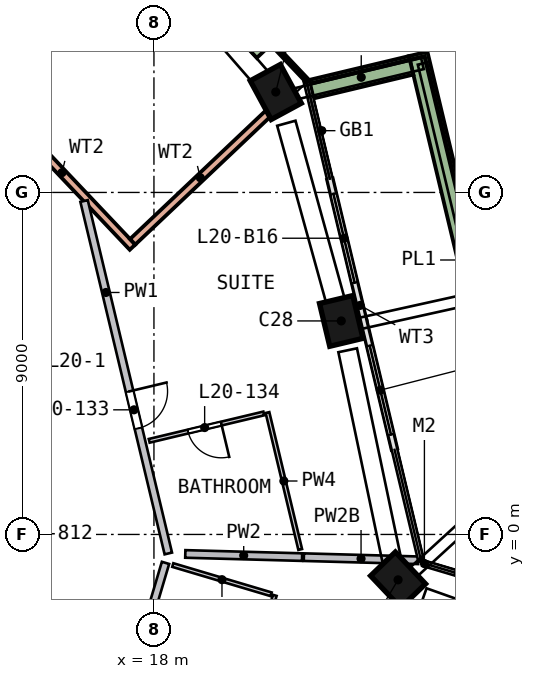
"""IFC4 building model, lengths in metres.
Left out: names, types, materials, properties, quantities, classifications, styles, units other than length and angle.
Written with IfcOpenShell. Run it as: python <this file> out.ifc"""

import sys

from ifc_helpers import new_model, si_unit, direction, frame, frame_2d, origin, origin_2d, place, context, subcontext, project, spatial, rectangle, extrude, element, fill, save


model = new_model("IFC4")
c1 = context("Model", 3, precision=1e-05, world=origin(), true_north=direction((0.0, 1.0)))
c2 = subcontext(c1, "Body", "Model", "MODEL_VIEW")
j1 = project(units=[si_unit("LENGTHUNIT", "METRE"), si_unit("PLANEANGLEUNIT", "RADIAN")], contexts=[c1])
p1 = place(None, origin())
s1 = spatial("IfcSite", under=j1, at=p1, CompositionType="ELEMENT")
p2 = place(p1, origin())
s2 = spatial("IfcBuilding", under=s1, at=p2, CompositionType="ELEMENT")
p3 = place(p2, frame((0.0, 0.0, 89.5)))
s3 = spatial("IfcBuildingStorey", under=s2, at=p3, CompositionType="ELEMENT", Elevation=89.5)
p4 = place(p3, frame((24.417, -1.335, 0.0), z_axis=(0.005397091, 0.116151488, 0.993216846), x_axis=(0.690131688, -0.719208539, 0.080357516)))
e1 = element("IfcColumn", 1, at=p4, inside=s3, PredefinedType="COLUMN", context=c2, shape_type="SweptSolid", body=[
    extrude(rectangle(XDim=1.15, YDim=0.9, at=origin_2d()), origin(), (0.0, 0.0, 1.0), 3.212),
])
p5 = place(p3, frame((22.962, 5.487, 0.0), z_axis=(-0.027073959, 0.108980291, 0.993675147), x_axis=(-0.231384883, 0.9663603, -0.112288943)))
e2 = element("IfcColumn", 2, at=p5, inside=s3, PredefinedType="COLUMN", context=c2, shape_type="SweptSolid", body=[
    extrude(rectangle(XDim=1.15, YDim=0.9, at=origin_2d()), origin(), (0.0, 0.0, 1.0), 3.21),
])
p6 = place(p3, frame((21.273, 11.521, 0.0), z_axis=(-0.05557524, 0.100734874, 0.993359893), x_axis=(0.472451123, -0.873816203, 0.115044255)))
e3 = element("IfcColumn", 3, at=p6, inside=s3, PredefinedType="COLUMN", context=c2, shape_type="SweptSolid", body=[
    extrude(rectangle(XDim=1.15, YDim=0.9, at=origin_2d()), origin(), (0.0, 0.0, 1.0), 3.211),
])
p7 = place(p3, frame((24.329, 2.241, 0.0), z_axis=(0.0, 0.0, 1.0), x_axis=(-0.232405626, 0.972618952, 0.0)))
e4 = element("IfcWall", 4, at=p7, inside=s3, PredefinedType="SOLIDWALL", context=c2, shape_type="SweptSolid", body=[
    extrude(rectangle(XDim=3.475, YDim=0.15, at=frame_2d((1.738, 0.0))), origin(), (0.0, 0.0, 1.0), 2.425),
])
p8 = place(p7, frame((0.4, 0.0, 0.0)))
e5 = element("IfcOpeningElement", 5, at=p8, cuts=e4, PredefinedType="OPENING", context=c2, shape_type="SweptSolid", body=[
    extrude(rectangle(XDim=2.4, YDim=2.4, at=frame_2d((1.2, 1.2))), frame((0.0, 0.085, 0.0), z_axis=(0.0, -1.0, 0.0), x_axis=(1.0, 0.0, 0.0)), (0.0, 0.0, 1.0), 0.17),
])
p9 = place(p3, frame((23.521, 5.621, 0.0), z_axis=(0.0, 0.0, 1.0), x_axis=(-0.232397815, 0.972620818, 0.0)))
e6 = element("IfcWall", 6, at=p9, inside=s3, PredefinedType="SOLIDWALL", context=c2, shape_type="SweptSolid", body=[
    extrude(rectangle(XDim=3.835, YDim=0.15, at=frame_2d((1.918, 0.0))), origin(), (0.0, 0.0, 1.0), 2.425),
])
p10 = place(p9, frame((1.035, 0.0, 0.0)))
e7 = element("IfcOpeningElement", 7, at=p10, cuts=e6, PredefinedType="OPENING", context=c2, shape_type="SweptSolid", body=[
    extrude(rectangle(XDim=2.4, YDim=2.4, at=frame_2d((1.2, 1.2))), frame((0.0, 0.085, 0.0), z_axis=(0.0, -1.0, 0.0), x_axis=(1.0, 0.0, 0.0)), (0.0, 0.0, 1.0), 0.17),
])
p11 = place(p3, frame((27.545, 1.799, 0.0), z_axis=(0.0, 0.0, 1.0), x_axis=(-0.232437266, 0.972611391, 0.0)))
e8 = element("IfcWall", 8, at=p11, inside=s3, PredefinedType="SOLIDWALL", context=c2, shape_type="SweptSolid", body=[
    extrude(rectangle(XDim=11.153, YDim=0.5, at=frame_2d((5.576, 0.0))), origin(), (0.0, 0.0, 1.0), 0.7),
])
p12 = place(p3, frame((24.767, 12.345, 0.0), z_axis=(0.0, 0.0, 1.0), x_axis=(-0.972602017, -0.232476487, 0.0)))
e9 = element("IfcWall", 9, at=p12, inside=s3, PredefinedType="SOLIDWALL", context=c2, shape_type="SweptSolid", body=[
    extrude(rectangle(XDim=2.699, YDim=0.5, at=frame_2d((1.35, 0.0))), origin(), (0.0, 0.0, 1.0), 0.7),
])
p13 = place(p3, frame((8.498, 16.999, 0.0), z_axis=(0.0, 0.0, 1.0), x_axis=(0.687585757, -0.726103179, 0.0)))
e10 = element("IfcWall", 10, at=p13, inside=s3, PredefinedType="SOLIDWALL", context=c2, shape_type="SweptSolid", body=[
    extrude(rectangle(XDim=13.0, YDim=0.2, at=frame_2d((6.5, 0.0))), origin(), (0.0, 0.0, 1.0), 3.19),
])
p14 = place(p13, frame((5.6, 0.0, 0.0)))
e11 = element("IfcOpeningElement", 11, at=p14, cuts=e10, PredefinedType="OPENING", context=c2, shape_type="SweptSolid", body=[
    extrude(rectangle(XDim=1.8, YDim=2.4, at=frame_2d((0.9, 1.2))), frame((0.0, 0.11, 0.0), z_axis=(0.0, -1.0, 0.0), x_axis=(1.0, 0.0, 0.0)), (0.0, 0.0, 1.0), 0.22),
])
p15 = place(p3, frame((21.001, 11.073, 0.0), z_axis=(0.0, 0.0, 1.0), x_axis=(-0.726084786, -0.68760518, 0.0)))
e12 = element("IfcWall", 12, at=p15, inside=s3, PredefinedType="SOLIDWALL", context=c2, shape_type="SweptSolid", body=[
    extrude(rectangle(XDim=4.905, YDim=0.2, at=frame_2d((2.452, 0.0))), origin(), (0.0, 0.0, 1.0), 3.19),
])
p16 = place(p3, frame((21.992, 11.984, 0.0), z_axis=(0.0, 0.0, 1.0), x_axis=(-0.687593273, 0.726096062, 0.0)))
e13 = element("IfcWall", 13, at=p16, inside=s3, PredefinedType="SOLIDWALL", context=c2, shape_type="SweptSolid", body=[
    extrude(rectangle(XDim=12.84, YDim=0.1, at=frame_2d((6.42, 0.0))), origin(), (0.0, 0.0, 1.0), 0.7),
])
p17 = place(p3, frame((20.888, 12.713, 0.0), z_axis=(0.0, 0.0, 1.0), x_axis=(-0.687591182, 0.726098041, 0.0)))
e14 = element("IfcWall", 14, at=p17, inside=s3, PredefinedType="SOLIDWALL", context=c2, shape_type="SweptSolid", body=[
    extrude(rectangle(XDim=4.457, YDim=0.5, at=frame_2d((2.229, 0.0))), origin(), (0.0, 0.0, 1.0), 0.7),
])
p18 = place(p3, frame((16.161, 8.775, 0.0), z_axis=(0.0, 0.0, 1.0), x_axis=(0.232426863, -0.972613877, 0.0)))
e15 = element("IfcWall", 15, at=p18, inside=s3, PredefinedType="SOLIDWALL", context=c2, shape_type="SweptSolid", body=[
    extrude(rectangle(XDim=9.537, YDim=0.2, at=frame_2d((4.768, 0.0))), origin(), (0.0, 0.0, 1.0), 3.19),
])
p19 = place(p18, frame((5.15, 0.0, 0.0)))
e16 = element("IfcOpeningElement", 16, at=p19, cuts=e15, PredefinedType="OPENING", context=c2, shape_type="SweptSolid", body=[
    extrude(rectangle(XDim=1.0, YDim=2.1, at=frame_2d((0.5, 1.05))), frame((0.0, 0.11, 0.0), z_axis=(0.0, -1.0, 0.0), x_axis=(1.0, 0.0, 0.0)), (0.0, 0.0, 1.0), 0.22),
])
p20 = place(p3, frame((17.335, -4.007, 0.0), z_axis=(0.0, 0.0, 1.0), x_axis=(0.284995231, 0.958528934, 0.0)))
e17 = element("IfcWall", 17, at=p20, inside=s3, PredefinedType="SOLIDWALL", context=c2, shape_type="SweptSolid", body=[
    extrude(rectangle(XDim=3.4, YDim=0.2, at=frame_2d((1.7, 0.0))), origin(), (0.0, 0.0, 1.0), 3.19),
])
p21 = place(p3, frame((18.825, -0.513, 0.0), z_axis=(0.0, 0.0, 1.0), x_axis=(0.999629093, -0.027233739, 0.0)))
e18 = element("IfcWall", 18, at=p21, inside=s3, PredefinedType="SOLIDWALL", context=c2, shape_type="SweptSolid", body=[
    extrude(rectangle(XDim=3.075, YDim=0.2, at=frame_2d((1.538, 0.0))), origin(), (0.0, 0.0, 1.0), 3.19),
])
p22 = place(p3, frame((21.945, -0.598, 0.0), z_axis=(0.0, 0.0, 1.0), x_axis=(0.999628909, -0.027240496, 0.0)))
e19 = element("IfcWall", 19, at=p22, inside=s3, PredefinedType="SOLIDWALL", context=c2, shape_type="SweptSolid", body=[
    extrude(rectangle(XDim=3.011, YDim=0.2, at=frame_2d((1.506, 0.0))), origin(), (0.0, 0.0, 1.0), 2.69),
])
p23 = place(p3, frame((20.89, 3.184, 0.0), z_axis=(0.0, 0.0, 1.0), x_axis=(-0.972619152, -0.232404787, 0.0)))
e20 = element("IfcWall", 20, at=p23, inside=s3, PredefinedType="PARTITIONING", context=c2, shape_type="SweptSolid", body=[
    extrude(rectangle(XDim=3.1, YDim=0.1, at=frame_2d((1.55, 0.0))), origin(), (0.0, 0.0, 1.0), 3.19),
])
p24 = place(p23, frame((1.15, 0.0, 0.0)))
e21 = element("IfcOpeningElement", 21, at=p24, cuts=e20, PredefinedType="OPENING", context=c2, shape_type="SweptSolid", body=[
    extrude(rectangle(XDim=0.9, YDim=2.1, at=frame_2d((0.45, 1.05))), frame((0.0, 0.06, 0.0), z_axis=(0.0, -1.0, 0.0), x_axis=(1.0, 0.0, 0.0)), (0.0, 0.0, 1.0), 0.12),
])
p25 = place(p3, frame((21.084, -1.575, 0.0), z_axis=(0.0, 0.0, 1.0), x_axis=(-0.958520333, 0.285024159, 0.0)))
e22 = element("IfcWall", 22, at=p25, inside=s3, PredefinedType="PARTITIONING", context=c2, shape_type="SweptSolid", body=[
    extrude(rectangle(XDim=2.7, YDim=0.1, at=frame_2d((1.35, 0.0))), origin(), (0.0, 0.0, 1.0), 3.19),
])
p26 = place(p3, frame((20.268, -4.67, 0.0), z_axis=(0.0, 0.0, 1.0), x_axis=(0.285044157, 0.958514386, 0.0)))
e23 = element("IfcWall", 23, at=p26, inside=s3, PredefinedType="PARTITIONING", context=c2, shape_type="SweptSolid", body=[
    extrude(rectangle(XDim=3.2, YDim=0.1, at=frame_2d((1.6, 0.0))), origin(), (0.0, 0.0, 1.0), 3.19),
])
p27 = place(p26, frame((1.05, 0.0, 0.0)))
e24 = element("IfcOpeningElement", 24, at=p27, cuts=e23, PredefinedType="OPENING", context=c2, shape_type="SweptSolid", body=[
    extrude(rectangle(XDim=0.9, YDim=2.1, at=frame_2d((0.45, 1.05))), frame((0.0, 0.06, 0.0), z_axis=(0.0, -1.0, 0.0), x_axis=(1.0, 0.0, 0.0)), (0.0, 0.0, 1.0), 0.12),
])
p28 = place(p3, frame((20.988, 3.208, 0.0), z_axis=(0.0, 0.0, 1.0), x_axis=(0.232410563, -0.972617772, 0.0)))
e25 = element("IfcWall", 25, at=p28, inside=s3, PredefinedType="PARTITIONING", context=c2, shape_type="SweptSolid", body=[
    extrude(rectangle(XDim=3.704, YDim=0.1, at=frame_2d((1.852, 0.0))), origin(), (0.0, 0.0, 1.0), 3.19),
])
p29 = place(p8, origin())
e26 = element("IfcDoor", 26, at=p29, inside=s3, OperationType="SLIDING_TO_RIGHT", PredefinedType="DOOR", context=c2, shape_type="SweptSolid", body=[
    extrude(rectangle(XDim=2.4, YDim=2.4, at=frame_2d((1.2, 1.2))), frame((0.0, 0.025, 0.0), z_axis=(0.0, -1.0, 0.0), x_axis=(1.0, 0.0, 0.0)), (0.0, 0.0, 1.0), 0.05),
])
fill(e5, e26)
p30 = place(p10, origin())
e27 = element("IfcDoor", 27, at=p30, inside=s3, OperationType="SLIDING_TO_LEFT", PredefinedType="DOOR", context=c2, shape_type="SweptSolid", body=[
    extrude(rectangle(XDim=2.4, YDim=2.4, at=frame_2d((1.2, 1.2))), frame((0.0, 0.025, 0.0), z_axis=(0.0, -1.0, 0.0), x_axis=(1.0, 0.0, 0.0)), (0.0, 0.0, 1.0), 0.05),
])
fill(e7, e27)
p31 = place(p19, origin())
e28 = element("IfcDoor", 28, at=p31, inside=s3, OperationType="SINGLE_SWING_LEFT", PredefinedType="DOOR", context=c2, shape_type="SweptSolid", body=[
    extrude(rectangle(XDim=1.0, YDim=2.1, at=frame_2d((0.5, 1.05))), frame((0.0, 0.025, 0.0), z_axis=(0.0, -1.0, 0.0), x_axis=(1.0, 0.0, 0.0)), (0.0, 0.0, 1.0), 0.05),
])
fill(e16, e28)
p32 = place(p24, origin())
e29 = element("IfcDoor", 29, at=p32, inside=s3, OperationType="SINGLE_SWING_LEFT", PredefinedType="DOOR", context=c2, shape_type="SweptSolid", body=[
    extrude(rectangle(XDim=0.9, YDim=2.1, at=frame_2d((0.45, 1.05))), frame((0.0, 0.025, 0.0), z_axis=(0.0, -1.0, 0.0), x_axis=(1.0, 0.0, 0.0)), (0.0, 0.0, 1.0), 0.05),
])
fill(e21, e29)
save(model, sys.argv[1])
